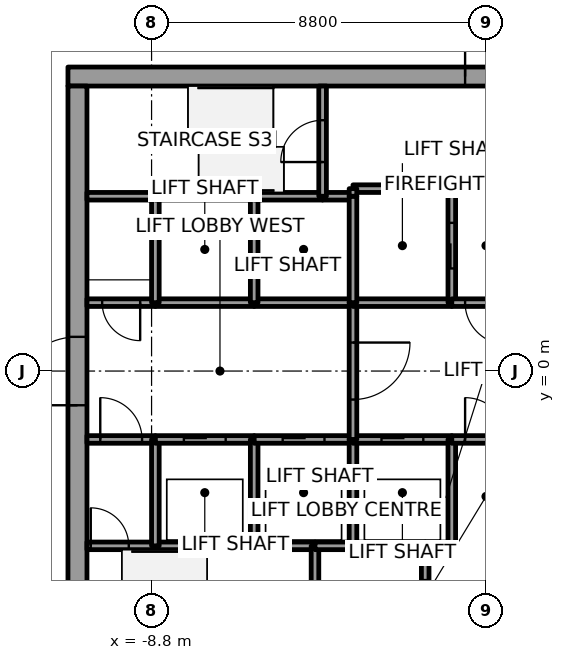
"""IFC4 building model, lengths in metres.
Left out: names, types, materials, properties, quantities, classifications, styles, units other than length and angle.
Written with IfcOpenShell. Run it as: python <this file> out.ifc"""

import sys

from ifc_helpers import new_model, si_unit, direction, frame, frame_2d, origin, place, context, subcontext, project, spatial, rectangle, extrude, element, fill, save


model = new_model("IFC4")
c1 = context("Model", 3, precision=1e-05, world=origin(), true_north=direction((0.0, 1.0)))
c2 = subcontext(c1, "Body", "Model", "MODEL_VIEW")
j1 = project(units=[si_unit("LENGTHUNIT", "METRE"), si_unit("PLANEANGLEUNIT", "RADIAN")], contexts=[c1])
p1 = place(None, origin())
s1 = spatial("IfcSite", under=j1, at=p1, CompositionType="ELEMENT")
p2 = place(p1, origin())
s2 = spatial("IfcBuilding", under=s1, at=p2, CompositionType="ELEMENT")
p3 = place(p2, frame((0.0, 0.0, 28.8)))
s3 = spatial("IfcBuildingStorey", under=s2, at=p3, CompositionType="ELEMENT", Elevation=28.8)
p4 = place(p3, frame((-11.0, 7.75, 0.0), z_axis=(0.0, 0.0, 1.0), x_axis=(1.0, 0.0, 0.0)))
e1 = element("IfcWall", 1, at=p4, inside=s3, PredefinedType="SHEAR", context=c2, shape_type="SweptSolid", body=[
    extrude(rectangle(XDim=22.0, YDim=0.5, at=frame_2d((11.0, 0.0))), origin(), (0.0, 0.0, 1.0), 5.4),
])
p5 = place(p4, frame((10.45, 0.0, 0.0)))
e2 = element("IfcOpeningElement", 2, at=p5, cuts=e1, PredefinedType="OPENING", context=c2, shape_type="SweptSolid", body=[
    extrude(rectangle(XDim=1.1, YDim=2.1, at=frame_2d((0.55, 1.05))), frame((0.0, 0.25, 0.0), z_axis=(0.0, -1.0, 0.0), x_axis=(1.0, 0.0, 0.0)), (0.0, 0.0, 1.0), 0.5),
])
p6 = place(p3, frame((-10.75, -7.5, 0.0), z_axis=(0.0, 0.0, 1.0), x_axis=(0.0, 1.0, 0.0)))
e3 = element("IfcWall", 3, at=p6, inside=s3, PredefinedType="SHEAR", context=c2, shape_type="SweptSolid", body=[
    extrude(rectangle(XDim=15.0, YDim=0.5, at=frame_2d((7.5, 0.0))), origin(), (0.0, 0.0, 1.0), 5.4),
])
p7 = place(p6, frame((6.6, 0.0, 0.0)))
e4 = element("IfcOpeningElement", 4, at=p7, cuts=e3, PredefinedType="OPENING", context=c2, shape_type="SweptSolid", body=[
    extrude(rectangle(XDim=1.8, YDim=2.1, at=frame_2d((0.9, 1.05))), frame((0.0, 0.25, 0.0), z_axis=(0.0, -1.0, 0.0), x_axis=(1.0, 0.0, 0.0)), (0.0, 0.0, 1.0), 0.5),
])
p8 = place(p3, frame((-10.5, -4.6, 0.0), z_axis=(0.0, 0.0, 1.0), x_axis=(1.0, 0.0, 0.0)))
e5 = element("IfcWall", 5, at=p8, inside=s3, PredefinedType="SOLIDWALL", context=c2, shape_type="SweptSolid", body=[
    extrude(rectangle(XDim=1.8, YDim=0.2, at=frame_2d((0.9, 0.0))), origin(), (0.0, 0.0, 1.0), 5.0),
])
p9 = place(p8, frame((0.1, 0.0, 0.0)))
e6 = element("IfcOpeningElement", 6, at=p9, cuts=e5, PredefinedType="OPENING", context=c2, shape_type="SweptSolid", body=[
    extrude(rectangle(XDim=1.0, YDim=2.1, at=frame_2d((0.5, 1.05))), frame((0.0, 0.1, 0.0), z_axis=(0.0, -1.0, 0.0), x_axis=(1.0, 0.0, 0.0)), (0.0, 0.0, 1.0), 0.2),
])
p10 = place(p3, frame((-10.5, -1.8, 0.0), z_axis=(0.0, 0.0, 1.0), x_axis=(1.0, 0.0, 0.0)))
e7 = element("IfcWall", 7, at=p10, inside=s3, PredefinedType="SOLIDWALL", context=c2, shape_type="SweptSolid", body=[
    extrude(rectangle(XDim=1.8, YDim=0.2, at=frame_2d((0.9, 0.0))), origin(), (0.0, 0.0, 1.0), 5.0),
])
p11 = place(p10, frame((0.35, 0.0, 0.0)))
e8 = element("IfcOpeningElement", 8, at=p11, cuts=e7, PredefinedType="OPENING", context=c2, shape_type="SweptSolid", body=[
    extrude(rectangle(XDim=1.1, YDim=2.4, at=frame_2d((0.55, 1.2))), frame((0.0, 0.1, 0.0), z_axis=(0.0, -1.0, 0.0), x_axis=(1.0, 0.0, 0.0)), (0.0, 0.0, 1.0), 0.2),
])
p12 = place(p3, frame((-8.7, 1.8, 0.0), z_axis=(0.0, 0.0, 1.0), x_axis=(-1.0, 0.0, 0.0)))
e9 = element("IfcWall", 9, at=p12, inside=s3, PredefinedType="SOLIDWALL", context=c2, shape_type="SweptSolid", body=[
    extrude(rectangle(XDim=1.8, YDim=0.2, at=frame_2d((0.9, 0.0))), origin(), (0.0, 0.0, 1.0), 5.0),
])
p13 = place(p12, frame((0.4, 0.0, 0.0)))
e10 = element("IfcOpeningElement", 10, at=p13, cuts=e9, PredefinedType="OPENING", context=c2, shape_type="SweptSolid", body=[
    extrude(rectangle(XDim=1.0, YDim=2.4, at=frame_2d((0.5, 1.2))), frame((0.0, 0.1, 0.0), z_axis=(0.0, -1.0, 0.0), x_axis=(1.0, 0.0, 0.0)), (0.0, 0.0, 1.0), 0.2),
])
p14 = place(p3, frame((-8.7, 4.6, 0.0), z_axis=(0.0, 0.0, 1.0), x_axis=(-1.0, 0.0, 0.0)))
e11 = element("IfcWall", 11, at=p14, inside=s3, PredefinedType="SOLIDWALL", context=c2, shape_type="SweptSolid", body=[
    extrude(rectangle(XDim=1.8, YDim=0.2, at=frame_2d((0.9, 0.0))), origin(), (0.0, 0.0, 1.0), 5.0),
])
p15 = place(p3, frame((-8.7, -4.6, 0.0), z_axis=(0.0, 0.0, 1.0), x_axis=(1.0, 0.0, 0.0)))
e12 = element("IfcWall", 12, at=p15, inside=s3, PredefinedType="SOLIDWALL", context=c2, shape_type="SweptSolid", body=[
    extrude(rectangle(XDim=2.6, YDim=0.2, at=frame_2d((1.3, 0.0))), origin(), (0.0, 0.0, 1.0), 5.0),
])
p16 = place(p3, frame((-8.7, -4.6, 0.0), z_axis=(0.0, 0.0, 1.0), x_axis=(0.0, 1.0, 0.0)))
e13 = element("IfcWall", 13, at=p16, inside=s3, PredefinedType="SOLIDWALL", context=c2, shape_type="SweptSolid", body=[
    extrude(rectangle(XDim=2.8, YDim=0.2, at=frame_2d((1.4, 0.0))), origin(), (0.0, 0.0, 1.0), 5.0),
])
p17 = place(p3, frame((-8.7, -1.8, 0.0), z_axis=(0.0, 0.0, 1.0), x_axis=(1.0, 0.0, 0.0)))
e14 = element("IfcWall", 14, at=p17, inside=s3, PredefinedType="SOLIDWALL", context=c2, shape_type="SweptSolid", body=[
    extrude(rectangle(XDim=2.6, YDim=0.2, at=frame_2d((1.3, 0.0))), origin(), (0.0, 0.0, 1.0), 5.0),
])
p18 = place(p17, frame((0.75, 0.0, 0.0)))
e15 = element("IfcOpeningElement", 15, at=p18, cuts=e14, PredefinedType="OPENING", context=c2, shape_type="SweptSolid", body=[
    extrude(rectangle(XDim=1.1, YDim=2.1, at=frame_2d((0.55, 1.05))), frame((0.0, 0.1, 0.0), z_axis=(0.0, -1.0, 0.0), x_axis=(1.0, 0.0, 0.0)), (0.0, 0.0, 1.0), 0.2),
])
p19 = place(p3, frame((-6.1, 1.8, 0.0), z_axis=(0.0, 0.0, 1.0), x_axis=(-1.0, 0.0, 0.0)))
e16 = element("IfcWall", 16, at=p19, inside=s3, PredefinedType="SOLIDWALL", context=c2, shape_type="SweptSolid", body=[
    extrude(rectangle(XDim=2.6, YDim=0.2, at=frame_2d((1.3, 0.0))), origin(), (0.0, 0.0, 1.0), 5.0),
])
p20 = place(p3, frame((-8.7, 1.8, 0.0), z_axis=(0.0, 0.0, 1.0), x_axis=(0.0, 1.0, 0.0)))
e17 = element("IfcWall", 17, at=p20, inside=s3, PredefinedType="SOLIDWALL", context=c2, shape_type="SweptSolid", body=[
    extrude(rectangle(XDim=2.8, YDim=0.2, at=frame_2d((1.4, 0.0))), origin(), (0.0, 0.0, 1.0), 5.0),
])
p21 = place(p3, frame((-6.1, 4.6, 0.0), z_axis=(0.0, 0.0, 1.0), x_axis=(-1.0, 0.0, 0.0)))
e18 = element("IfcWall", 18, at=p21, inside=s3, PredefinedType="SOLIDWALL", context=c2, shape_type="SweptSolid", body=[
    extrude(rectangle(XDim=2.6, YDim=0.2, at=frame_2d((1.3, 0.0))), origin(), (0.0, 0.0, 1.0), 5.0),
])
p22 = place(p3, frame((-6.1, -4.6, 0.0), z_axis=(0.0, 0.0, 1.0), x_axis=(1.0, 0.0, 0.0)))
e19 = element("IfcWall", 19, at=p22, inside=s3, PredefinedType="SOLIDWALL", context=c2, shape_type="SweptSolid", body=[
    extrude(rectangle(XDim=1.6, YDim=0.2, at=frame_2d((0.8, 0.0))), origin(), (0.0, 0.0, 1.0), 5.0),
])
p23 = place(p3, frame((-6.1, -4.6, 0.0), z_axis=(0.0, 0.0, 1.0), x_axis=(0.0, 1.0, 0.0)))
e20 = element("IfcWall", 20, at=p23, inside=s3, PredefinedType="SOLIDWALL", context=c2, shape_type="SweptSolid", body=[
    extrude(rectangle(XDim=2.8, YDim=0.2, at=frame_2d((1.4, 0.0))), origin(), (0.0, 0.0, 1.0), 5.0),
])
p24 = place(p3, frame((-6.1, -1.8, 0.0), z_axis=(0.0, 0.0, 1.0), x_axis=(1.0, 0.0, 0.0)))
e21 = element("IfcWall", 21, at=p24, inside=s3, PredefinedType="SOLIDWALL", context=c2, shape_type="SweptSolid", body=[
    extrude(rectangle(XDim=2.6, YDim=0.2, at=frame_2d((1.3, 0.0))), origin(), (0.0, 0.0, 1.0), 5.0),
])
p25 = place(p24, frame((0.75, 0.0, 0.0)))
e22 = element("IfcOpeningElement", 22, at=p25, cuts=e21, PredefinedType="OPENING", context=c2, shape_type="SweptSolid", body=[
    extrude(rectangle(XDim=1.1, YDim=2.1, at=frame_2d((0.55, 1.05))), frame((0.0, 0.1, 0.0), z_axis=(0.0, -1.0, 0.0), x_axis=(1.0, 0.0, 0.0)), (0.0, 0.0, 1.0), 0.2),
])
p26 = place(p3, frame((-3.5, 1.8, 0.0), z_axis=(0.0, 0.0, 1.0), x_axis=(-1.0, 0.0, 0.0)))
e23 = element("IfcWall", 23, at=p26, inside=s3, PredefinedType="SOLIDWALL", context=c2, shape_type="SweptSolid", body=[
    extrude(rectangle(XDim=2.6, YDim=0.2, at=frame_2d((1.3, 0.0))), origin(), (0.0, 0.0, 1.0), 5.0),
])
p27 = place(p3, frame((-6.1, 1.8, 0.0), z_axis=(0.0, 0.0, 1.0), x_axis=(0.0, 1.0, 0.0)))
e24 = element("IfcWall", 24, at=p27, inside=s3, PredefinedType="SOLIDWALL", context=c2, shape_type="SweptSolid", body=[
    extrude(rectangle(XDim=2.8, YDim=0.2, at=frame_2d((1.4, 0.0))), origin(), (0.0, 0.0, 1.0), 5.0),
])
p28 = place(p3, frame((-4.3, 4.6, 0.0), z_axis=(0.0, 0.0, 1.0), x_axis=(-1.0, 0.0, 0.0)))
e25 = element("IfcWall", 25, at=p28, inside=s3, PredefinedType="SOLIDWALL", context=c2, shape_type="SweptSolid", body=[
    extrude(rectangle(XDim=1.8, YDim=0.2, at=frame_2d((0.9, 0.0))), origin(), (0.0, 0.0, 1.0), 5.0),
])
p29 = place(p3, frame((-4.5, -4.6, 0.0), z_axis=(0.0, 0.0, 1.0), x_axis=(0.0, -1.0, 0.0)))
e26 = element("IfcWall", 26, at=p29, inside=s3, PredefinedType="SOLIDWALL", context=c2, shape_type="SweptSolid", body=[
    extrude(rectangle(XDim=2.9, YDim=0.2, at=frame_2d((1.45, 0.0))), origin(), (0.0, 0.0, 1.0), 5.0),
])
p30 = place(p3, frame((-4.5, -4.6, 0.0), z_axis=(0.0, 0.0, 1.0), x_axis=(1.0, 0.0, 0.0)))
e27 = element("IfcWall", 27, at=p30, inside=s3, PredefinedType="SOLIDWALL", context=c2, shape_type="SweptSolid", body=[
    extrude(rectangle(XDim=1.0, YDim=0.2, at=frame_2d((0.5, 0.0))), origin(), (0.0, 0.0, 1.0), 5.0),
])
p31 = place(p3, frame((-3.5, 4.6, 0.0), z_axis=(0.0, 0.0, 1.0), x_axis=(-1.0, 0.0, 0.0)))
e28 = element("IfcWall", 28, at=p31, inside=s3, PredefinedType="SOLIDWALL", context=c2, shape_type="SweptSolid", body=[
    extrude(rectangle(XDim=0.8, YDim=0.2, at=frame_2d((0.4, 0.0))), origin(), (0.0, 0.0, 1.0), 5.0),
])
p32 = place(p3, frame((-4.3, 4.6, 0.0), z_axis=(0.0, 0.0, 1.0), x_axis=(0.0, 1.0, 0.0)))
e29 = element("IfcWall", 29, at=p32, inside=s3, PredefinedType="SOLIDWALL", context=c2, shape_type="SweptSolid", body=[
    extrude(rectangle(XDim=2.9, YDim=0.2, at=frame_2d((1.45, 0.0))), origin(), (0.0, 0.0, 1.0), 5.0),
])
p33 = place(p32, frame((0.9, 0.0, 0.0)))
e30 = element("IfcOpeningElement", 30, at=p33, cuts=e29, PredefinedType="OPENING", context=c2, shape_type="SweptSolid", body=[
    extrude(rectangle(XDim=1.1, YDim=2.4, at=frame_2d((0.55, 1.2))), frame((0.0, 0.1, 0.0), z_axis=(0.0, -1.0, 0.0), x_axis=(1.0, 0.0, 0.0)), (0.0, 0.0, 1.0), 0.2),
])
p34 = place(p3, frame((-3.5, -4.6, 0.0), z_axis=(0.0, 0.0, 1.0), x_axis=(1.0, 0.0, 0.0)))
e31 = element("IfcWall", 31, at=p34, inside=s3, PredefinedType="SOLIDWALL", context=c2, shape_type="SweptSolid", body=[
    extrude(rectangle(XDim=1.9, YDim=0.2, at=frame_2d((0.95, 0.0))), origin(), (0.0, 0.0, 1.0), 5.0),
])
p35 = place(p3, frame((-3.5, -4.6, 0.0), z_axis=(0.0, 0.0, 1.0), x_axis=(0.0, 1.0, 0.0)))
e32 = element("IfcWall", 32, at=p35, inside=s3, PredefinedType="SOLIDWALL", context=c2, shape_type="SweptSolid", body=[
    extrude(rectangle(XDim=2.8, YDim=0.2, at=frame_2d((1.4, 0.0))), origin(), (0.0, 0.0, 1.0), 5.0),
])
p36 = place(p3, frame((-3.5, -1.8, 0.0), z_axis=(0.0, 0.0, 1.0), x_axis=(1.0, 0.0, 0.0)))
e33 = element("IfcWall", 33, at=p36, inside=s3, PredefinedType="SOLIDWALL", context=c2, shape_type="SweptSolid", body=[
    extrude(rectangle(XDim=2.6, YDim=0.2, at=frame_2d((1.3, 0.0))), origin(), (0.0, 0.0, 1.0), 5.0),
])
p37 = place(p36, frame((0.75, 0.0, 0.0)))
e34 = element("IfcOpeningElement", 34, at=p37, cuts=e33, PredefinedType="OPENING", context=c2, shape_type="SweptSolid", body=[
    extrude(rectangle(XDim=1.1, YDim=2.1, at=frame_2d((0.55, 1.05))), frame((0.0, 0.1, 0.0), z_axis=(0.0, -1.0, 0.0), x_axis=(1.0, 0.0, 0.0)), (0.0, 0.0, 1.0), 0.2),
])
p38 = place(p3, frame((-3.5, 1.8, 0.0), z_axis=(0.0, 0.0, 1.0), x_axis=(0.0, -1.0, 0.0)))
e35 = element("IfcWall", 35, at=p38, inside=s3, PredefinedType="SOLIDWALL", context=c2, shape_type="SweptSolid", body=[
    extrude(rectangle(XDim=3.6, YDim=0.2, at=frame_2d((1.8, 0.0))), origin(), (0.0, 0.0, 1.0), 5.0),
])
p39 = place(p38, frame((1.05, 0.0, 0.0)))
e36 = element("IfcOpeningElement", 36, at=p39, cuts=e35, PredefinedType="OPENING", context=c2, shape_type="SweptSolid", body=[
    extrude(rectangle(XDim=1.5, YDim=2.4, at=frame_2d((0.75, 1.2))), frame((0.0, 0.1, 0.0), z_axis=(0.0, -1.0, 0.0), x_axis=(1.0, 0.0, 0.0)), (0.0, 0.0, 1.0), 0.2),
])
p40 = place(p3, frame((-0.9, 1.8, 0.0), z_axis=(0.0, 0.0, 1.0), x_axis=(-1.0, 0.0, 0.0)))
e37 = element("IfcWall", 37, at=p40, inside=s3, PredefinedType="SOLIDWALL", context=c2, shape_type="SweptSolid", body=[
    extrude(rectangle(XDim=2.6, YDim=0.2, at=frame_2d((1.3, 0.0))), origin(), (0.0, 0.0, 1.0), 5.0),
])
p41 = place(p3, frame((-3.5, 4.6, 0.0), z_axis=(0.0, 0.0, 1.0), x_axis=(0.0, -1.0, 0.0)))
e38 = element("IfcWall", 38, at=p41, inside=s3, PredefinedType="SOLIDWALL", context=c2, shape_type="SweptSolid", body=[
    extrude(rectangle(XDim=2.8, YDim=0.2, at=frame_2d((1.4, 0.0))), origin(), (0.0, 0.0, 1.0), 5.0),
])
p42 = place(p3, frame((-0.9, 1.8, 0.0), z_axis=(0.0, 0.0, 1.0), x_axis=(0.0, 1.0, 0.0)))
e39 = element("IfcWall", 39, at=p42, inside=s3, PredefinedType="SOLIDWALL", context=c2, shape_type="SweptSolid", body=[
    extrude(rectangle(XDim=3.0, YDim=0.2, at=frame_2d((1.5, 0.0))), origin(), (0.0, 0.0, 1.0), 5.0),
])
p43 = place(p42, frame((0.9, 0.0, 0.0)))
e40 = element("IfcOpeningElement", 40, at=p43, cuts=e39, PredefinedType="OPENING", context=c2, shape_type="SweptSolid", body=[
    extrude(rectangle(XDim=1.2, YDim=2.1, at=frame_2d((0.6, 1.05))), frame((0.0, 0.1, 0.0), z_axis=(0.0, -1.0, 0.0), x_axis=(1.0, 0.0, 0.0)), (0.0, 0.0, 1.0), 0.2),
])
p44 = place(p3, frame((-0.9, 4.8, 0.0), z_axis=(0.0, 0.0, 1.0), x_axis=(-1.0, 0.0, 0.0)))
e41 = element("IfcWall", 41, at=p44, inside=s3, PredefinedType="SOLIDWALL", context=c2, shape_type="SweptSolid", body=[
    extrude(rectangle(XDim=2.6, YDim=0.2, at=frame_2d((1.3, 0.0))), origin(), (0.0, 0.0, 1.0), 5.0),
])
p45 = place(p3, frame((-3.5, 4.8, 0.0), z_axis=(0.0, 0.0, 1.0), x_axis=(0.0, -1.0, 0.0)))
e42 = element("IfcWall", 42, at=p45, inside=s3, PredefinedType="SOLIDWALL", context=c2, shape_type="SweptSolid", body=[
    extrude(rectangle(XDim=0.2, YDim=0.2, at=frame_2d((0.1, 0.0))), origin(), (0.0, 0.0, 1.0), 5.0),
])
p46 = place(p3, frame((-1.6, -7.5, 0.0), z_axis=(0.0, 0.0, 1.0), x_axis=(0.0, 1.0, 0.0)))
e43 = element("IfcWall", 43, at=p46, inside=s3, PredefinedType="SOLIDWALL", context=c2, shape_type="SweptSolid", body=[
    extrude(rectangle(XDim=2.9, YDim=0.2, at=frame_2d((1.45, 0.0))), origin(), (0.0, 0.0, 1.0), 5.0),
])
p47 = place(p46, frame((0.9, 0.0, 0.0)))
e44 = element("IfcOpeningElement", 44, at=p47, cuts=e43, PredefinedType="OPENING", context=c2, shape_type="SweptSolid", body=[
    extrude(rectangle(XDim=1.1, YDim=2.1, at=frame_2d((0.55, 1.05))), frame((0.0, 0.1, 0.0), z_axis=(0.0, -1.0, 0.0), x_axis=(1.0, 0.0, 0.0)), (0.0, 0.0, 1.0), 0.2),
])
p48 = place(p3, frame((-1.6, -4.6, 0.0), z_axis=(0.0, 0.0, 1.0), x_axis=(1.0, 0.0, 0.0)))
e45 = element("IfcWall", 45, at=p48, inside=s3, PredefinedType="SOLIDWALL", context=c2, shape_type="SweptSolid", body=[
    extrude(rectangle(XDim=0.7, YDim=0.2, at=frame_2d((0.35, 0.0))), origin(), (0.0, 0.0, 1.0), 5.0),
])
p49 = place(p3, frame((-0.9, -4.6, 0.0), z_axis=(0.0, 0.0, 1.0), x_axis=(0.0, 1.0, 0.0)))
e46 = element("IfcWall", 46, at=p49, inside=s3, PredefinedType="SOLIDWALL", context=c2, shape_type="SweptSolid", body=[
    extrude(rectangle(XDim=2.8, YDim=0.2, at=frame_2d((1.4, 0.0))), origin(), (0.0, 0.0, 1.0), 5.0),
])
p50 = place(p3, frame((-0.9, -1.8, 0.0), z_axis=(0.0, 0.0, 1.0), x_axis=(1.0, 0.0, 0.0)))
e47 = element("IfcWall", 47, at=p50, inside=s3, PredefinedType="SOLIDWALL", context=c2, shape_type="SweptSolid", body=[
    extrude(rectangle(XDim=1.8, YDim=0.2, at=frame_2d((0.9, 0.0))), origin(), (0.0, 0.0, 1.0), 5.0),
])
p51 = place(p50, frame((0.35, 0.0, 0.0)))
e48 = element("IfcOpeningElement", 48, at=p51, cuts=e47, PredefinedType="OPENING", context=c2, shape_type="SweptSolid", body=[
    extrude(rectangle(XDim=1.1, YDim=2.4, at=frame_2d((0.55, 1.2))), frame((0.0, 0.1, 0.0), z_axis=(0.0, -1.0, 0.0), x_axis=(1.0, 0.0, 0.0)), (0.0, 0.0, 1.0), 0.2),
])
p52 = place(p3, frame((0.9, 1.8, 0.0), z_axis=(0.0, 0.0, 1.0), x_axis=(-1.0, 0.0, 0.0)))
e49 = element("IfcWall", 49, at=p52, inside=s3, PredefinedType="SOLIDWALL", context=c2, shape_type="SweptSolid", body=[
    extrude(rectangle(XDim=1.8, YDim=0.2, at=frame_2d((0.9, 0.0))), origin(), (0.0, 0.0, 1.0), 5.0),
])
p53 = place(p52, frame((0.35, 0.0, 0.0)))
e50 = element("IfcOpeningElement", 50, at=p53, cuts=e49, PredefinedType="OPENING", context=c2, shape_type="SweptSolid", body=[
    extrude(rectangle(XDim=1.1, YDim=2.4, at=frame_2d((0.55, 1.2))), frame((0.0, 0.1, 0.0), z_axis=(0.0, -1.0, 0.0), x_axis=(1.0, 0.0, 0.0)), (0.0, 0.0, 1.0), 0.2),
])
p54 = place(p18, origin())
e51 = element("IfcDoor", 51, at=p54, inside=s3, OperationType="SLIDING_TO_LEFT", PredefinedType="DOOR", context=c2, shape_type="SweptSolid", body=[
    extrude(rectangle(XDim=1.1, YDim=2.1, at=frame_2d((0.55, 1.05))), frame((0.0, 0.025, 0.0), z_axis=(0.0, -1.0, 0.0), x_axis=(1.0, 0.0, 0.0)), (0.0, 0.0, 1.0), 0.05),
])
fill(e15, e51)
p55 = place(p25, origin())
e52 = element("IfcDoor", 52, at=p55, inside=s3, OperationType="SLIDING_TO_RIGHT", PredefinedType="DOOR", context=c2, shape_type="SweptSolid", body=[
    extrude(rectangle(XDim=1.1, YDim=2.1, at=frame_2d((0.55, 1.05))), frame((0.0, 0.025, 0.0), z_axis=(0.0, -1.0, 0.0), x_axis=(1.0, 0.0, 0.0)), (0.0, 0.0, 1.0), 0.05),
])
fill(e22, e52)
p56 = place(p37, origin())
e53 = element("IfcDoor", 53, at=p56, inside=s3, OperationType="SLIDING_TO_RIGHT", PredefinedType="DOOR", context=c2, shape_type="SweptSolid", body=[
    extrude(rectangle(XDim=1.1, YDim=2.1, at=frame_2d((0.55, 1.05))), frame((0.0, 0.025, 0.0), z_axis=(0.0, -1.0, 0.0), x_axis=(1.0, 0.0, 0.0)), (0.0, 0.0, 1.0), 0.05),
])
fill(e34, e53)
p57 = place(p43, origin())
e54 = element("IfcDoor", 54, at=p57, inside=s3, OperationType="SLIDING_TO_RIGHT", PredefinedType="DOOR", context=c2, shape_type="SweptSolid", body=[
    extrude(rectangle(XDim=1.2, YDim=2.1, at=frame_2d((0.6, 1.05))), frame((0.0, 0.025, 0.0), z_axis=(0.0, -1.0, 0.0), x_axis=(1.0, 0.0, 0.0)), (0.0, 0.0, 1.0), 0.05),
])
fill(e40, e54)
p58 = place(p39, origin())
e55 = element("IfcDoor", 55, at=p58, inside=s3, OperationType="DOUBLE_DOOR_SINGLE_SWING", PredefinedType="DOOR", context=c2, shape_type="SweptSolid", body=[
    extrude(rectangle(XDim=1.5, YDim=2.4, at=frame_2d((0.75, 1.2))), frame((0.0, 0.025, 0.0), z_axis=(0.0, -1.0, 0.0), x_axis=(1.0, 0.0, 0.0)), (0.0, 0.0, 1.0), 0.05),
])
fill(e36, e55)
p59 = place(p11, origin())
e56 = element("IfcDoor", 56, at=p59, inside=s3, OperationType="SINGLE_SWING_RIGHT", PredefinedType="DOOR", context=c2, shape_type="SweptSolid", body=[
    extrude(rectangle(XDim=1.1, YDim=2.4, at=frame_2d((0.55, 1.2))), frame((0.0, 0.025, 0.0), z_axis=(0.0, -1.0, 0.0), x_axis=(1.0, 0.0, 0.0)), (0.0, 0.0, 1.0), 0.05),
])
fill(e8, e56)
p60 = place(p53, origin())
e57 = element("IfcDoor", 57, at=p60, inside=s3, OperationType="SINGLE_SWING_LEFT", PredefinedType="DOOR", context=c2, shape_type="SweptSolid", body=[
    extrude(rectangle(XDim=1.1, YDim=2.4, at=frame_2d((0.55, 1.2))), frame((0.0, 0.025, 0.0), z_axis=(0.0, -1.0, 0.0), x_axis=(1.0, 0.0, 0.0)), (0.0, 0.0, 1.0), 0.05),
])
fill(e50, e57)
p61 = place(p51, origin())
e58 = element("IfcDoor", 58, at=p61, inside=s3, OperationType="SINGLE_SWING_RIGHT", PredefinedType="DOOR", context=c2, shape_type="SweptSolid", body=[
    extrude(rectangle(XDim=1.1, YDim=2.4, at=frame_2d((0.55, 1.2))), frame((0.0, 0.025, 0.0), z_axis=(0.0, -1.0, 0.0), x_axis=(1.0, 0.0, 0.0)), (0.0, 0.0, 1.0), 0.05),
])
fill(e48, e58)
p62 = place(p13, origin())
e59 = element("IfcDoor", 59, at=p62, inside=s3, OperationType="SINGLE_SWING_LEFT", PredefinedType="DOOR", context=c2, shape_type="SweptSolid", body=[
    extrude(rectangle(XDim=1.0, YDim=2.4, at=frame_2d((0.5, 1.2))), frame((0.0, 0.025, 0.0), z_axis=(0.0, -1.0, 0.0), x_axis=(1.0, 0.0, 0.0)), (0.0, 0.0, 1.0), 0.05),
])
fill(e10, e59)
p63 = place(p9, origin())
e60 = element("IfcDoor", 60, at=p63, inside=s3, OperationType="SINGLE_SWING_LEFT", PredefinedType="DOOR", context=c2, shape_type="SweptSolid", body=[
    extrude(rectangle(XDim=1.0, YDim=2.1, at=frame_2d((0.5, 1.05))), frame((0.0, 0.025, 0.0), z_axis=(0.0, -1.0, 0.0), x_axis=(1.0, 0.0, 0.0)), (0.0, 0.0, 1.0), 0.05),
])
fill(e6, e60)
p64 = place(p33, origin())
e61 = element("IfcDoor", 61, at=p64, inside=s3, OperationType="SINGLE_SWING_RIGHT", PredefinedType="DOOR", context=c2, shape_type="SweptSolid", body=[
    extrude(rectangle(XDim=1.1, YDim=2.4, at=frame_2d((0.55, 1.2))), frame((0.0, 0.025, 0.0), z_axis=(0.0, -1.0, 0.0), x_axis=(1.0, 0.0, 0.0)), (0.0, 0.0, 1.0), 0.05),
])
fill(e30, e61)
p65 = place(p7, origin())
e62 = element("IfcDoor", 62, at=p65, inside=s3, OperationType="DOUBLE_DOOR_SINGLE_SWING", PredefinedType="DOOR", context=c2, shape_type="SweptSolid", body=[
    extrude(rectangle(XDim=1.8, YDim=2.1, at=frame_2d((0.9, 1.05))), frame((0.0, 0.025, 0.0), z_axis=(0.0, -1.0, 0.0), x_axis=(1.0, 0.0, 0.0)), (0.0, 0.0, 1.0), 0.05),
])
fill(e4, e62)
p66 = place(p5, origin())
e63 = element("IfcDoor", 63, at=p66, inside=s3, OperationType="SINGLE_SWING_RIGHT", PredefinedType="DOOR", context=c2, shape_type="SweptSolid", body=[
    extrude(rectangle(XDim=1.1, YDim=2.1, at=frame_2d((0.55, 1.05))), frame((0.0, 0.025, 0.0), z_axis=(0.0, -1.0, 0.0), x_axis=(1.0, 0.0, 0.0)), (0.0, 0.0, 1.0), 0.05),
])
fill(e2, e63)
save(model, sys.argv[1])
